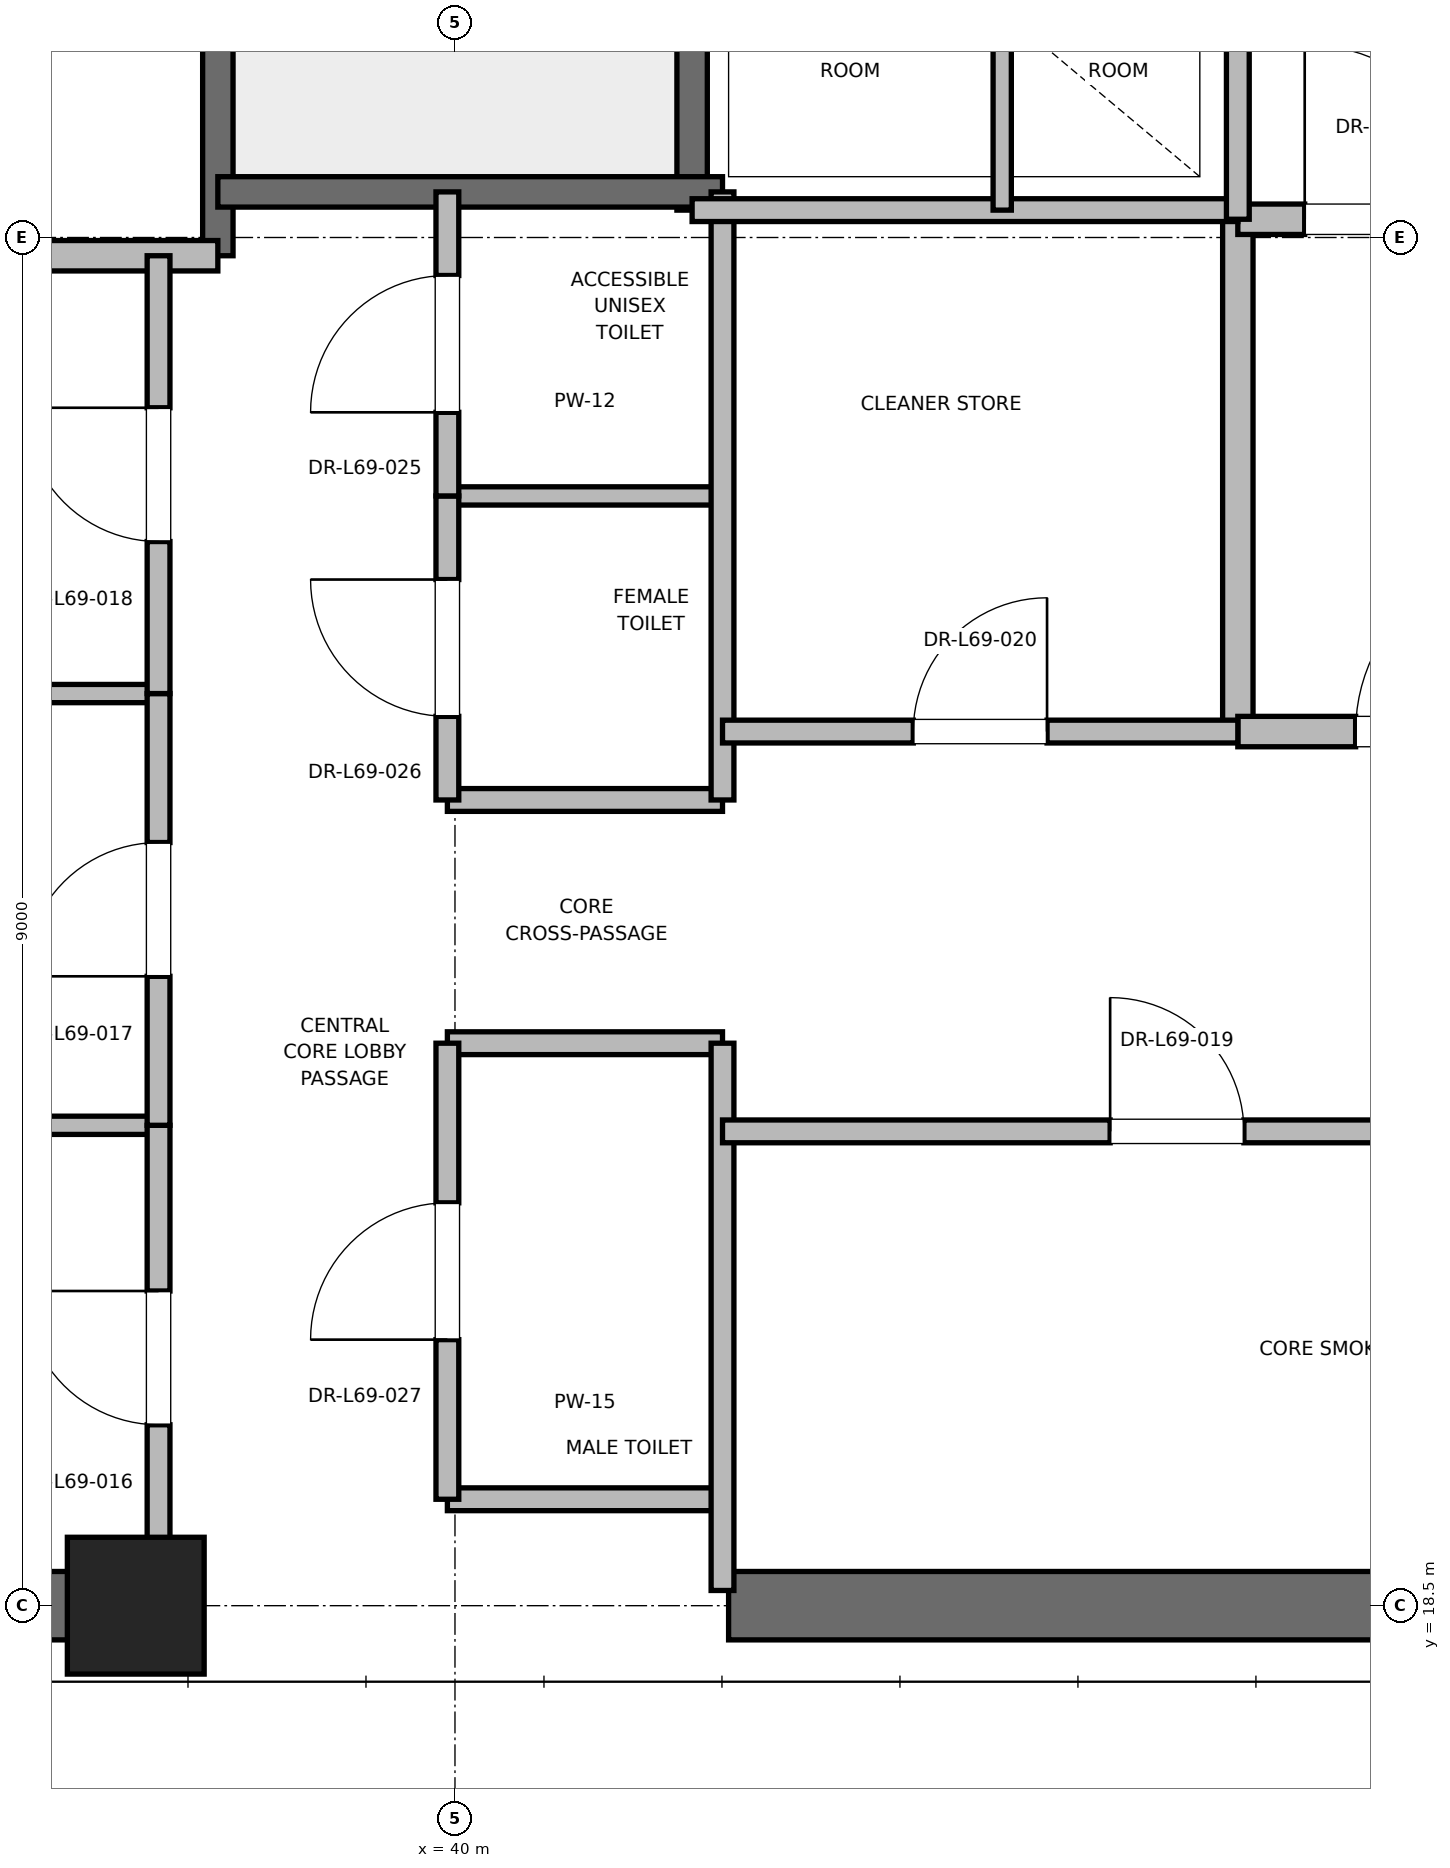
"""IFC4 building model, lengths in metres.
Left out: names, types, materials, properties, quantities, classifications, styles, units other than length and angle.
Written with IfcOpenShell. Run it as: python <this file> out.ifc"""

import sys

from ifc_helpers import new_model, si_unit, direction, frame, frame_2d, origin, origin_2d, place, context, subcontext, project, spatial, rectangle, extrude, element, fill, save


model = new_model("IFC4")
c1 = context("Model", 3, precision=1e-05, world=origin(), true_north=direction((0.0, 1.0)))
c2 = subcontext(c1, "Body", "Model", "MODEL_VIEW")
j1 = project(units=[si_unit("LENGTHUNIT", "METRE"), si_unit("PLANEANGLEUNIT", "RADIAN")], contexts=[c1])
p1 = place(None, origin())
s1 = spatial("IfcSite", under=j1, at=p1, CompositionType="ELEMENT")
p2 = place(p1, origin())
s2 = spatial("IfcBuilding", under=s1, at=p2, CompositionType="ELEMENT")
p3 = place(p2, frame((0.0, 0.0, 295.2)))
s3 = spatial("IfcBuildingStorey", under=s2, at=p3, CompositionType="ELEMENT", Elevation=295.2)
p4 = place(p3, frame((37.9, 18.5, 0.0), z_axis=(0.0, 0.0, 1.0), x_axis=(1.0, 0.0, 0.0)))
e1 = element("IfcColumn", 1, at=p4, inside=s3, PredefinedType="PILASTER", context=c2, shape_type="SweptSolid", body=[
    extrude(rectangle(XDim=0.9, YDim=0.9, at=origin_2d()), origin(), (0.0, 0.0, 1.0), 5.8),
])
for number, where, z_axis, x_axis in (
    (2, (29.0, 18.5, 0.0), (0.0, 0.0, 1.0), (1.0, 0.0, 0.0)),
    (3, (41.8, 18.5, 0.0), (0.0, 0.0, 1.0), (1.0, 0.0, 0.0)),
):
    element("IfcWall", number, at=place(p3, frame(where, z_axis=z_axis, x_axis=x_axis)), inside=s3, PredefinedType="SHEAR", context=c2, shape_type="SweptSolid", body=[
        extrude(rectangle(XDim=9.2, YDim=0.45, at=frame_2d((4.6, 0.0))), origin(), (0.0, 0.0, 1.0), 5.5),
    ])
p5 = place(p3, frame((38.44, 27.38, 0.0), z_axis=(0.0, 0.0, 1.0), x_axis=(0.0, 1.0, 0.0)))
e4 = element("IfcWall", 4, at=p5, inside=s3, PredefinedType="SOLIDWALL", context=c2, shape_type="SweptSolid", body=[
    extrude(rectangle(XDim=8.87, YDim=0.2, at=frame_2d((4.435, 0.0))), origin(), (0.0, 0.0, 1.0), 5.5),
])
p6 = place(p3, frame((41.56, 27.68, 0.0), z_axis=(0.0, 0.0, 1.0), x_axis=(0.0, 1.0, 0.0)))
e5 = element("IfcWall", 5, at=p6, inside=s3, PredefinedType="SOLIDWALL", context=c2, shape_type="SweptSolid", body=[
    extrude(rectangle(XDim=8.57, YDim=0.2, at=frame_2d((4.285, 0.0))), origin(), (0.0, 0.0, 1.0), 5.5),
])
p7 = place(p3, frame((38.44, 27.8, 0.0), z_axis=(0.0, 0.0, 1.0), x_axis=(1.0, 0.0, 0.0)))
e6 = element("IfcWall", 6, at=p7, inside=s3, PredefinedType="SOLIDWALL", context=c2, shape_type="SweptSolid", body=[
    extrude(rectangle(XDim=3.32, YDim=0.2, at=frame_2d((1.66, 0.0))), origin(), (0.0, 0.0, 1.0), 5.5),
])
p8 = place(p3, frame((32.82, 27.38, 0.0), z_axis=(0.0, 0.0, 1.0), x_axis=(1.0, 0.0, 0.0)))
e7 = element("IfcWall", 7, at=p8, inside=s3, PredefinedType="PARTITIONING", context=c2, shape_type="SweptSolid", body=[
    extrude(rectangle(XDim=5.62, YDim=0.2, at=frame_2d((2.81, 0.0))), origin(), (0.0, 0.0, 1.0), 5.5),
])
p9 = place(p3, frame((45.15, 24.25, 0.0), z_axis=(0.0, 0.0, 1.0), x_axis=(0.0, 1.0, 0.0)))
e8 = element("IfcWall", 8, at=p9, inside=s3, PredefinedType="PARTITIONING", context=c2, shape_type="SweptSolid", body=[
    extrude(rectangle(XDim=3.37, YDim=0.2, at=frame_2d((1.685, 0.0))), origin(), (0.0, 0.0, 1.0), 5.5),
])
p10 = place(p3, frame((45.15, 24.25, 0.0), z_axis=(0.0, 0.0, 1.0), x_axis=(1.0, 0.0, 0.0)))
e9 = element("IfcWall", 9, at=p10, inside=s3, PredefinedType="PARTITIONING", context=c2, shape_type="SweptSolid", body=[
    extrude(rectangle(XDim=2.7, YDim=0.2, at=frame_2d((1.35, 0.0))), origin(), (0.0, 0.0, 1.0), 5.5),
])
p11 = place(p10, frame((0.775, 0.0, 0.0)))
e10 = element("IfcOpeningElement", 10, at=p11, cuts=e9, PredefinedType="OPENING", context=c2, shape_type="SweptSolid", body=[
    extrude(rectangle(XDim=1.15, YDim=2.2, at=frame_2d((0.575, 1.1))), frame((0.0, 0.1, 0.0), z_axis=(0.0, -1.0, 0.0), x_axis=(1.0, 0.0, 0.0)), (0.0, 0.0, 1.0), 0.2),
])
p12 = place(p3, frame((45.15, 27.62, 0.0), z_axis=(0.0, 0.0, 1.0), x_axis=(1.0, 0.0, 0.0)))
e11 = element("IfcWall", 11, at=p12, inside=s3, PredefinedType="PARTITIONING", context=c2, shape_type="SweptSolid", body=[
    extrude(rectangle(XDim=2.03, YDim=0.2, at=frame_2d((1.015, 0.0))), origin(), (0.0, 0.0, 1.0), 5.5),
])
p13 = place(p12, frame((0.44, 0.0, 0.0)))
e12 = element("IfcOpeningElement", 12, at=p13, cuts=e11, PredefinedType="OPENING", context=c2, shape_type="SweptSolid", body=[
    extrude(rectangle(XDim=1.15, YDim=2.2, at=frame_2d((0.575, 1.1))), frame((0.0, 0.1, 0.0), z_axis=(0.0, -1.0, 0.0), x_axis=(1.0, 0.0, 0.0)), (0.0, 0.0, 1.0), 0.2),
])
for number, where, z_axis, x_axis in (
    (13, (39.95, 19.2, 0.0), (0.0, 0.0, 1.0), (1.0, 0.0, 0.0)),
    (14, (39.95, 22.2, 0.0), (0.0, 0.0, 1.0), (1.0, 0.0, 0.0)),
    (15, (39.95, 23.8, 0.0), (0.0, 0.0, 1.0), (1.0, 0.0, 0.0)),
):
    element("IfcWall", number, at=place(p3, frame(where, z_axis=z_axis, x_axis=x_axis)), inside=s3, PredefinedType="PARTITIONING", context=c2, shape_type="SweptSolid", body=[
        extrude(rectangle(XDim=1.81, YDim=0.15, at=frame_2d((0.905, 0.0))), origin(), (0.0, 0.0, 1.0), 2.85),
    ])
p14 = place(p3, frame((39.95, 25.8, 0.0), z_axis=(0.0, 0.0, 1.0), x_axis=(1.0, 0.0, 0.0)))
e16 = element("IfcWall", 16, at=p14, inside=s3, PredefinedType="PARTITIONING", context=c2, shape_type="SweptSolid", body=[
    extrude(rectangle(XDim=1.81, YDim=0.12, at=frame_2d((0.905, 0.0))), origin(), (0.0, 0.0, 1.0), 2.85),
])
p15 = place(p3, frame((41.76, 18.6, 0.0), z_axis=(0.0, 0.0, 1.0), x_axis=(0.0, 1.0, 0.0)))
e17 = element("IfcWall", 17, at=p15, inside=s3, PredefinedType="PARTITIONING", context=c2, shape_type="SweptSolid", body=[
    extrude(rectangle(XDim=3.6, YDim=0.15, at=frame_2d((1.8, 0.0))), origin(), (0.0, 0.0, 1.0), 2.85),
])
p16 = place(p3, frame((41.76, 23.8, 0.0), z_axis=(0.0, 0.0, 1.0), x_axis=(0.0, 1.0, 0.0)))
e18 = element("IfcWall", 18, at=p16, inside=s3, PredefinedType="PARTITIONING", context=c2, shape_type="SweptSolid", body=[
    extrude(rectangle(XDim=4.0, YDim=0.15, at=frame_2d((2.0, 0.0))), origin(), (0.0, 0.0, 1.0), 2.85),
])
p17 = place(p3, frame((39.95, 19.2, 0.0), z_axis=(0.0, 0.0, 1.0), x_axis=(0.0, 1.0, 0.0)))
e19 = element("IfcWall", 19, at=p17, inside=s3, PredefinedType="PARTITIONING", context=c2, shape_type="SweptSolid", body=[
    extrude(rectangle(XDim=3.0, YDim=0.15, at=frame_2d((1.5, 0.0))), origin(), (0.0, 0.0, 1.0), 2.85),
])
p18 = place(p17, frame((1.05, 0.0, 0.0)))
e20 = element("IfcOpeningElement", 20, at=p18, cuts=e19, PredefinedType="OPENING", context=c2, shape_type="SweptSolid", body=[
    extrude(rectangle(XDim=0.9, YDim=2.1, at=frame_2d((0.45, 1.05))), frame((0.0, 0.075, 0.0), z_axis=(0.0, -1.0, 0.0), x_axis=(1.0, 0.0, 0.0)), (0.0, 0.0, 1.0), 0.15),
])
p19 = place(p3, frame((39.95, 23.8, 0.0), z_axis=(0.0, 0.0, 1.0), x_axis=(0.0, 1.0, 0.0)))
e21 = element("IfcWall", 21, at=p19, inside=s3, PredefinedType="PARTITIONING", context=c2, shape_type="SweptSolid", body=[
    extrude(rectangle(XDim=2.0, YDim=0.15, at=frame_2d((1.0, 0.0))), origin(), (0.0, 0.0, 1.0), 2.85),
])
p20 = place(p19, frame((0.55, 0.0, 0.0)))
e22 = element("IfcOpeningElement", 22, at=p20, cuts=e21, PredefinedType="OPENING", context=c2, shape_type="SweptSolid", body=[
    extrude(rectangle(XDim=0.9, YDim=2.1, at=frame_2d((0.45, 1.05))), frame((0.0, 0.075, 0.0), z_axis=(0.0, -1.0, 0.0), x_axis=(1.0, 0.0, 0.0)), (0.0, 0.0, 1.0), 0.15),
])
p21 = place(p3, frame((39.95, 25.8, 0.0), z_axis=(0.0, 0.0, 1.0), x_axis=(0.0, 1.0, 0.0)))
e23 = element("IfcWall", 23, at=p21, inside=s3, PredefinedType="PARTITIONING", context=c2, shape_type="SweptSolid", body=[
    extrude(rectangle(XDim=2.0, YDim=0.15, at=frame_2d((1.0, 0.0))), origin(), (0.0, 0.0, 1.0), 2.85),
])
p22 = place(p21, frame((0.55, 0.0, 0.0)))
e24 = element("IfcOpeningElement", 24, at=p22, cuts=e23, PredefinedType="OPENING", context=c2, shape_type="SweptSolid", body=[
    extrude(rectangle(XDim=0.9, YDim=2.1, at=frame_2d((0.45, 1.05))), frame((0.0, 0.075, 0.0), z_axis=(0.0, -1.0, 0.0), x_axis=(1.0, 0.0, 0.0)), (0.0, 0.0, 1.0), 0.15),
])
for number, where, z_axis, x_axis in (
    (25, (32.82, 21.66, 0.0), (0.0, 0.0, 1.0), (1.0, 0.0, 0.0)),
    (26, (32.82, 24.5, 0.0), (0.0, 0.0, 1.0), (1.0, 0.0, 0.0)),
):
    element("IfcWall", number, at=place(p3, frame(where, z_axis=z_axis, x_axis=x_axis)), inside=s3, PredefinedType="PARTITIONING", context=c2, shape_type="SweptSolid", body=[
        extrude(rectangle(XDim=5.23, YDim=0.12, at=frame_2d((2.615, 0.0))), origin(), (0.0, 0.0, 1.0), 2.85),
    ])
p23 = place(p3, frame((38.05, 18.6, 0.0), z_axis=(0.0, 0.0, 1.0), x_axis=(0.0, 1.0, 0.0)))
e27 = element("IfcWall", 27, at=p23, inside=s3, PredefinedType="PARTITIONING", context=c2, shape_type="SweptSolid", body=[
    extrude(rectangle(XDim=3.06, YDim=0.15, at=frame_2d((1.53, 0.0))), origin(), (0.0, 0.0, 1.0), 2.85),
])
p24 = place(p23, frame((1.09, 0.0, 0.0)))
e28 = element("IfcOpeningElement", 28, at=p24, cuts=e27, PredefinedType="OPENING", context=c2, shape_type="SweptSolid", body=[
    extrude(rectangle(XDim=0.88, YDim=2.1, at=frame_2d((0.44, 1.05))), frame((0.0, 0.075, 0.0), z_axis=(0.0, -1.0, 0.0), x_axis=(1.0, 0.0, 0.0)), (0.0, 0.0, 1.0), 0.15),
])
p25 = place(p3, frame((38.05, 21.66, 0.0), z_axis=(0.0, 0.0, 1.0), x_axis=(0.0, 1.0, 0.0)))
e29 = element("IfcWall", 29, at=p25, inside=s3, PredefinedType="PARTITIONING", context=c2, shape_type="SweptSolid", body=[
    extrude(rectangle(XDim=2.84, YDim=0.15, at=frame_2d((1.42, 0.0))), origin(), (0.0, 0.0, 1.0), 2.85),
])
p26 = place(p25, frame((0.98, 0.0, 0.0)))
e30 = element("IfcOpeningElement", 30, at=p26, cuts=e29, PredefinedType="OPENING", context=c2, shape_type="SweptSolid", body=[
    extrude(rectangle(XDim=0.88, YDim=2.1, at=frame_2d((0.44, 1.05))), frame((0.0, 0.075, 0.0), z_axis=(0.0, -1.0, 0.0), x_axis=(1.0, 0.0, 0.0)), (0.0, 0.0, 1.0), 0.15),
])
p27 = place(p3, frame((38.05, 24.5, 0.0), z_axis=(0.0, 0.0, 1.0), x_axis=(0.0, 1.0, 0.0)))
e31 = element("IfcWall", 31, at=p27, inside=s3, PredefinedType="PARTITIONING", context=c2, shape_type="SweptSolid", body=[
    extrude(rectangle(XDim=2.88, YDim=0.15, at=frame_2d((1.44, 0.0))), origin(), (0.0, 0.0, 1.0), 2.85),
])
p28 = place(p27, frame((1.0, 0.0, 0.0)))
e32 = element("IfcOpeningElement", 32, at=p28, cuts=e31, PredefinedType="OPENING", context=c2, shape_type="SweptSolid", body=[
    extrude(rectangle(XDim=0.88, YDim=2.1, at=frame_2d((0.44, 1.05))), frame((0.0, 0.075, 0.0), z_axis=(0.0, -1.0, 0.0), x_axis=(1.0, 0.0, 0.0)), (0.0, 0.0, 1.0), 0.15),
])
p29 = place(p3, frame((41.56, 27.68, 0.0), z_axis=(0.0, 0.0, 1.0), x_axis=(1.0, 0.0, 0.0)))
e33 = element("IfcWall", 33, at=p29, inside=s3, PredefinedType="PARTITIONING", context=c2, shape_type="SweptSolid", body=[
    extrude(rectangle(XDim=3.59, YDim=0.15, at=frame_2d((1.795, 0.0))), origin(), (0.0, 0.0, 1.0), 2.85),
])
p30 = place(p3, frame((41.76, 21.62, 0.0), z_axis=(0.0, 0.0, 1.0), x_axis=(1.0, 0.0, 0.0)))
e34 = element("IfcWall", 34, at=p30, inside=s3, PredefinedType="PARTITIONING", context=c2, shape_type="SweptSolid", body=[
    extrude(rectangle(XDim=5.98, YDim=0.15, at=frame_2d((2.99, 0.0))), origin(), (0.0, 0.0, 1.0), 2.85),
])
p31 = place(p30, frame((2.55, 0.0, 0.0)))
e35 = element("IfcOpeningElement", 35, at=p31, cuts=e34, PredefinedType="OPENING", context=c2, shape_type="SweptSolid", body=[
    extrude(rectangle(XDim=0.88, YDim=2.1, at=frame_2d((0.44, 1.05))), frame((0.0, 0.075, 0.0), z_axis=(0.0, -1.0, 0.0), x_axis=(1.0, 0.0, 0.0)), (0.0, 0.0, 1.0), 0.15),
])
p32 = place(p3, frame((41.76, 24.25, 0.0), z_axis=(0.0, 0.0, 1.0), x_axis=(1.0, 0.0, 0.0)))
e36 = element("IfcWall", 36, at=p32, inside=s3, PredefinedType="PARTITIONING", context=c2, shape_type="SweptSolid", body=[
    extrude(rectangle(XDim=3.39, YDim=0.15, at=frame_2d((1.695, 0.0))), origin(), (0.0, 0.0, 1.0), 2.85),
])
p33 = place(p32, frame((1.255, 0.0, 0.0)))
e37 = element("IfcOpeningElement", 37, at=p33, cuts=e36, PredefinedType="OPENING", context=c2, shape_type="SweptSolid", body=[
    extrude(rectangle(XDim=0.88, YDim=2.1, at=frame_2d((0.44, 1.05))), frame((0.0, 0.075, 0.0), z_axis=(0.0, -1.0, 0.0), x_axis=(1.0, 0.0, 0.0)), (0.0, 0.0, 1.0), 0.15),
])
p34 = place(p3, frame((45.15, 27.62, 0.0), z_axis=(0.0, 0.0, 1.0), x_axis=(0.0, 1.0, 0.0)))
e38 = element("IfcWall", 38, at=p34, inside=s3, PredefinedType="PARTITIONING", context=c2, shape_type="SweptSolid", body=[
    extrude(rectangle(XDim=3.1, YDim=0.15, at=frame_2d((1.55, 0.0))), origin(), (0.0, 0.0, 1.0), 2.85),
])
p35 = place(p3, frame((43.6, 27.68, 0.0), z_axis=(0.0, 0.0, 1.0), x_axis=(0.0, 1.0, 0.0)))
e39 = element("IfcWall", 39, at=p35, inside=s3, PredefinedType="PARTITIONING", context=c2, shape_type="SweptSolid", body=[
    extrude(rectangle(XDim=3.04, YDim=0.12, at=frame_2d((1.52, 0.0))), origin(), (0.0, 0.0, 1.0), 2.85),
])
p36 = place(p11, origin())
e40 = element("IfcDoor", 40, at=p36, inside=s3, OperationType="SINGLE_SWING_RIGHT", PredefinedType="DOOR", context=c2, shape_type="SweptSolid", body=[
    extrude(rectangle(XDim=1.15, YDim=2.2, at=frame_2d((0.575, 1.1))), frame((0.0, 0.025, 0.0), z_axis=(0.0, -1.0, 0.0), x_axis=(1.0, 0.0, 0.0)), (0.0, 0.0, 1.0), 0.05),
])
fill(e10, e40)
p37 = place(p13, origin())
e41 = element("IfcDoor", 41, at=p37, inside=s3, OperationType="SINGLE_SWING_LEFT", PredefinedType="DOOR", context=c2, shape_type="SweptSolid", body=[
    extrude(rectangle(XDim=1.15, YDim=2.2, at=frame_2d((0.575, 1.1))), frame((0.0, 0.025, 0.0), z_axis=(0.0, -1.0, 0.0), x_axis=(1.0, 0.0, 0.0)), (0.0, 0.0, 1.0), 0.05),
])
fill(e12, e41)
p38 = place(p18, origin())
e42 = element("IfcDoor", 42, at=p38, inside=s3, OperationType="SINGLE_SWING_LEFT", PredefinedType="DOOR", context=c2, shape_type="SweptSolid", body=[
    extrude(rectangle(XDim=0.9, YDim=2.1, at=frame_2d((0.45, 1.05))), frame((0.0, 0.025, 0.0), z_axis=(0.0, -1.0, 0.0), x_axis=(1.0, 0.0, 0.0)), (0.0, 0.0, 1.0), 0.05),
])
fill(e20, e42)
p39 = place(p20, origin())
e43 = element("IfcDoor", 43, at=p39, inside=s3, OperationType="SINGLE_SWING_RIGHT", PredefinedType="DOOR", context=c2, shape_type="SweptSolid", body=[
    extrude(rectangle(XDim=0.9, YDim=2.1, at=frame_2d((0.45, 1.05))), frame((0.0, 0.025, 0.0), z_axis=(0.0, -1.0, 0.0), x_axis=(1.0, 0.0, 0.0)), (0.0, 0.0, 1.0), 0.05),
])
fill(e22, e43)
p40 = place(p22, origin())
e44 = element("IfcDoor", 44, at=p40, inside=s3, OperationType="SINGLE_SWING_LEFT", PredefinedType="DOOR", context=c2, shape_type="SweptSolid", body=[
    extrude(rectangle(XDim=0.9, YDim=2.1, at=frame_2d((0.45, 1.05))), frame((0.0, 0.025, 0.0), z_axis=(0.0, -1.0, 0.0), x_axis=(1.0, 0.0, 0.0)), (0.0, 0.0, 1.0), 0.05),
])
fill(e24, e44)
p41 = place(p24, origin())
e45 = element("IfcDoor", 45, at=p41, inside=s3, OperationType="SINGLE_SWING_RIGHT", PredefinedType="DOOR", context=c2, shape_type="SweptSolid", body=[
    extrude(rectangle(XDim=0.88, YDim=2.1, at=frame_2d((0.44, 1.05))), frame((0.0, 0.025, 0.0), z_axis=(0.0, -1.0, 0.0), x_axis=(1.0, 0.0, 0.0)), (0.0, 0.0, 1.0), 0.05),
])
fill(e28, e45)
p42 = place(p26, origin())
e46 = element("IfcDoor", 46, at=p42, inside=s3, OperationType="SINGLE_SWING_LEFT", PredefinedType="DOOR", context=c2, shape_type="SweptSolid", body=[
    extrude(rectangle(XDim=0.88, YDim=2.1, at=frame_2d((0.44, 1.05))), frame((0.0, 0.025, 0.0), z_axis=(0.0, -1.0, 0.0), x_axis=(1.0, 0.0, 0.0)), (0.0, 0.0, 1.0), 0.05),
])
fill(e30, e46)
p43 = place(p28, origin())
e47 = element("IfcDoor", 47, at=p43, inside=s3, OperationType="SINGLE_SWING_RIGHT", PredefinedType="DOOR", context=c2, shape_type="SweptSolid", body=[
    extrude(rectangle(XDim=0.88, YDim=2.1, at=frame_2d((0.44, 1.05))), frame((0.0, 0.025, 0.0), z_axis=(0.0, -1.0, 0.0), x_axis=(1.0, 0.0, 0.0)), (0.0, 0.0, 1.0), 0.05),
])
fill(e32, e47)
p44 = place(p31, origin())
e48 = element("IfcDoor", 48, at=p44, inside=s3, OperationType="SINGLE_SWING_LEFT", PredefinedType="DOOR", context=c2, shape_type="SweptSolid", body=[
    extrude(rectangle(XDim=0.88, YDim=2.1, at=frame_2d((0.44, 1.05))), frame((0.0, 0.025, 0.0), z_axis=(0.0, -1.0, 0.0), x_axis=(1.0, 0.0, 0.0)), (0.0, 0.0, 1.0), 0.05),
])
fill(e35, e48)
p45 = place(p33, origin())
e49 = element("IfcDoor", 49, at=p45, inside=s3, OperationType="SINGLE_SWING_RIGHT", PredefinedType="DOOR", context=c2, shape_type="SweptSolid", body=[
    extrude(rectangle(XDim=0.88, YDim=2.1, at=frame_2d((0.44, 1.05))), frame((0.0, 0.025, 0.0), z_axis=(0.0, -1.0, 0.0), x_axis=(1.0, 0.0, 0.0)), (0.0, 0.0, 1.0), 0.05),
])
fill(e37, e49)
save(model, sys.argv[1])
